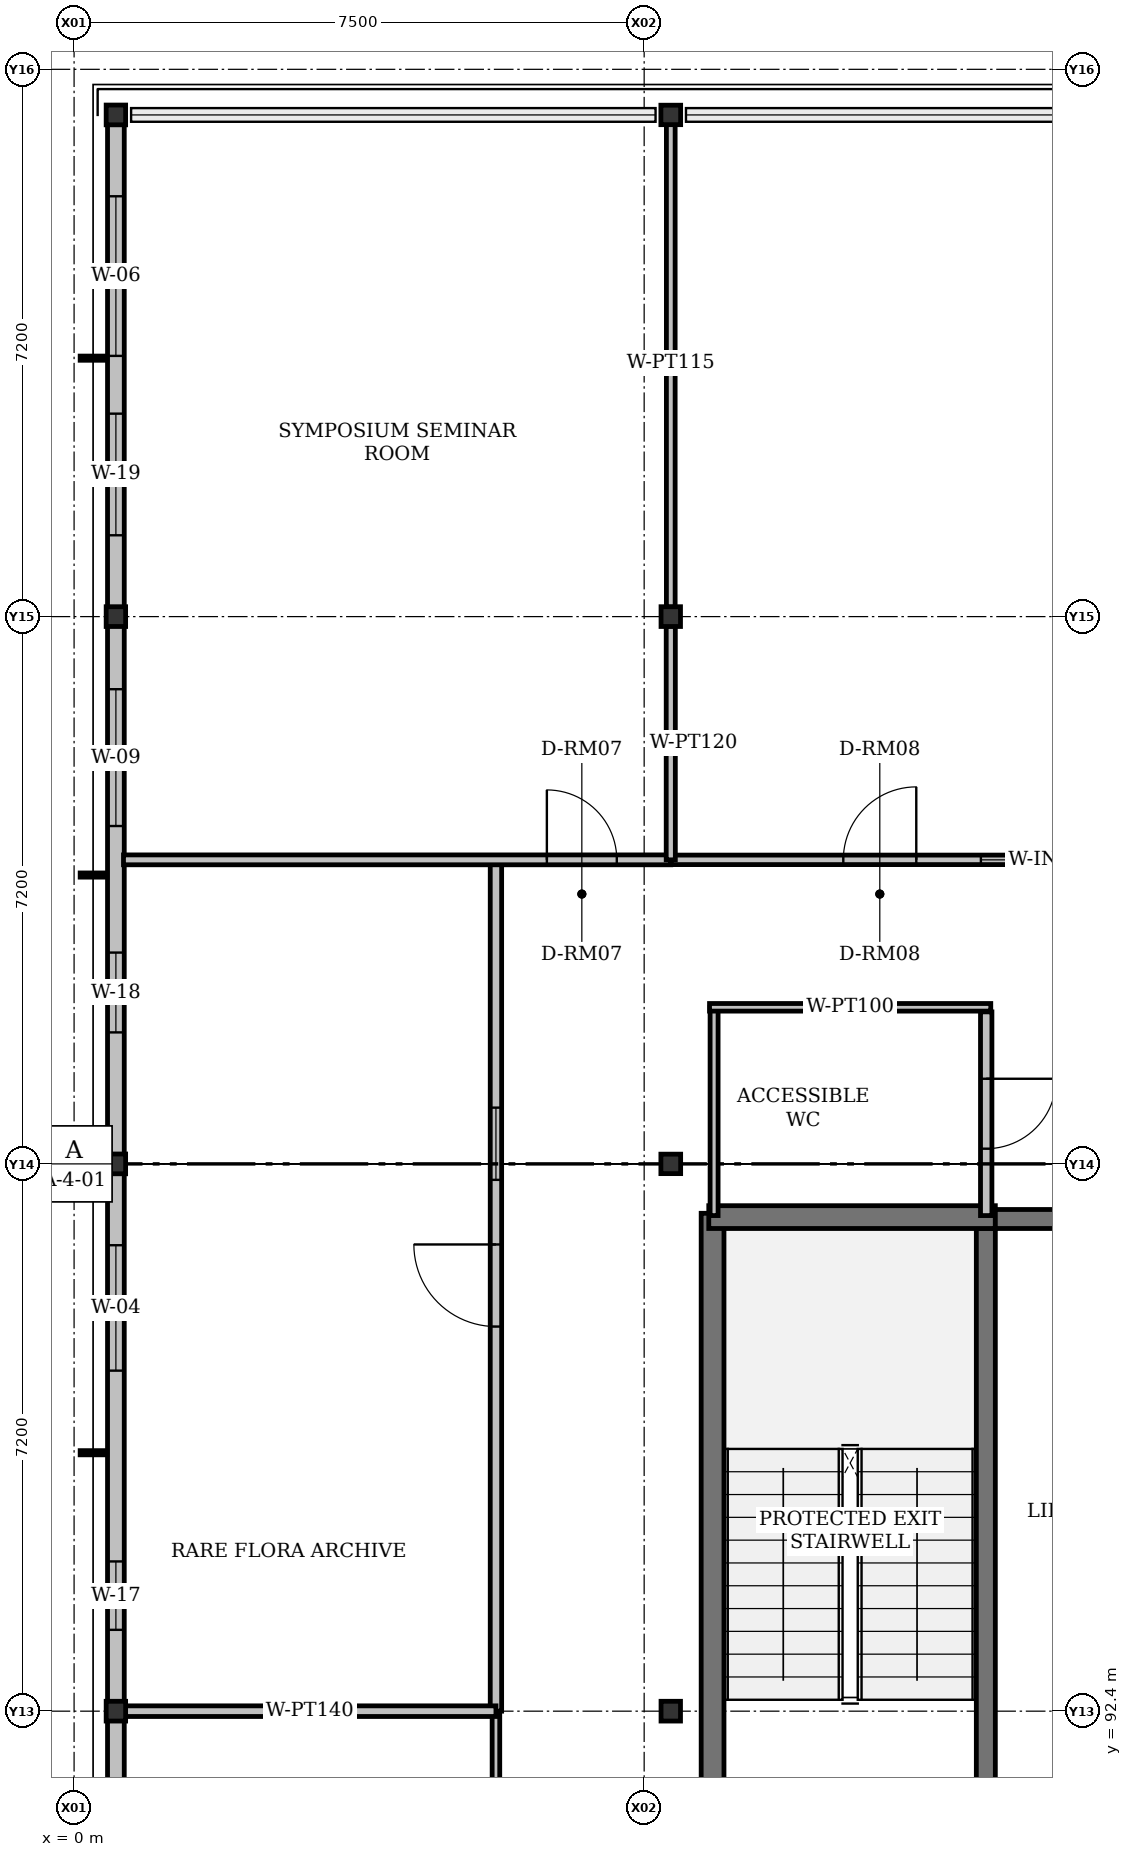
"""IFC4 building model, lengths in metres.
Left out: names, types, materials, properties, quantities, classifications, styles, units other than length and angle.
Written with IfcOpenShell. Run it as: python <this file> out.ifc"""

import sys

from ifc_helpers import new_model, si_unit, direction, frame, frame_2d, origin, origin_2d, place, context, subcontext, project, spatial, rectangle, i_section, extrude, element, fill, save


model = new_model("IFC4")
c1 = context("Model", 3, precision=1e-05, world=origin(), true_north=direction((0.0, 1.0)))
c2 = subcontext(c1, "Body", "Model", "MODEL_VIEW")
j1 = project(units=[si_unit("LENGTHUNIT", "METRE"), si_unit("PLANEANGLEUNIT", "RADIAN")], contexts=[c1])
p1 = place(None, origin())
s1 = spatial("IfcSite", under=j1, at=p1, CompositionType="ELEMENT")
p2 = place(p1, origin())
s2 = spatial("IfcBuilding", under=s1, at=p2, CompositionType="ELEMENT")
p3 = place(p2, frame((0.0, 0.0, 60.3)))
s3 = spatial("IfcBuildingStorey", under=s2, at=p3, CompositionType="ELEMENT", Elevation=60.3)
for number, where, z_axis, x_axis in (
    (1, (0.55, 92.4, 0.0), (0.0, 0.0, 1.0), (1.0, 0.0, 0.0)),
    (2, (7.85, 92.4, 0.0), (0.0, 0.0, 1.0), (1.0, 0.0, 0.0)),
    (3, (0.55, 99.6, 0.0), (0.0, 0.0, 1.0), (1.0, 0.0, 0.0)),
    (4, (7.85, 99.6, 0.0), (0.0, 0.0, 1.0), (0.0, 1.0, 0.0)),
    (5, (0.55, 106.8, 0.0), (0.0, 0.0, 1.0), (1.0, 0.0, 0.0)),
    (6, (7.85, 106.8, 0.0), (0.0, 0.0, 1.0), (1.0, 0.0, 0.0)),
    (7, (0.55, 113.4, 0.0), (0.0, 0.0, 1.0), (1.0, 0.0, 0.0)),
    (8, (7.85, 113.4, 0.0), (0.0, 0.0, 1.0), (0.0, 1.0, 0.0)),
):
    element("IfcColumn", number, at=place(p3, frame(where, z_axis=z_axis, x_axis=x_axis)), inside=s3, PredefinedType="COLUMN", context=c2, shape_type="SweptSolid", body=[
        extrude(i_section(OverallWidth=0.256, OverallDepth=0.26, WebThickness=0.011, FlangeThickness=0.017, FilletRadius=0.013, at=origin_2d()), origin(), (0.0, 0.0, 1.0), 4.2),
    ])
p4 = place(p3, frame((0.55, 85.2, 0.0), z_axis=(0.0, 0.0, 1.0), x_axis=(0.0, 1.0, 0.0)))
e9 = element("IfcWall", 9, at=p4, inside=s3, PredefinedType="SOLIDWALL", context=c2, shape_type="SweptSolid", body=[
    extrude(rectangle(XDim=7.2, YDim=0.22, at=frame_2d((3.6, 0.0))), origin(), (0.0, 0.0, 1.0), 3.577),
])
p5 = place(p4, frame((1.07, 0.0, 0.92)))
e10 = element("IfcOpeningElement", 10, at=p5, cuts=e9, PredefinedType="OPENING", context=c2, shape_type="SweptSolid", body=[
    extrude(rectangle(XDim=2.4, YDim=1.7, at=frame_2d((1.2, 0.85))), frame((0.0, 0.11, 0.0), z_axis=(0.0, -1.0, 0.0), x_axis=(1.0, 0.0, 0.0)), (0.0, 0.0, 1.0), 0.22),
])
p6 = place(p4, frame((4.63, 0.0, 0.92)))
e11 = element("IfcOpeningElement", 11, at=p6, cuts=e9, PredefinedType="OPENING", context=c2, shape_type="SweptSolid", body=[
    extrude(rectangle(XDim=1.5, YDim=1.4, at=frame_2d((0.75, 0.7))), frame((0.0, 0.11, 0.0), z_axis=(0.0, -1.0, 0.0), x_axis=(1.0, 0.0, 0.0)), (0.0, 0.0, 1.0), 0.22),
])
p7 = place(p3, frame((0.55, 92.4, 0.0), z_axis=(0.0, 0.0, 1.0), x_axis=(0.0, 1.0, 0.0)))
e12 = element("IfcWall", 12, at=p7, inside=s3, PredefinedType="SOLIDWALL", context=c2, shape_type="SweptSolid", body=[
    extrude(rectangle(XDim=7.2, YDim=0.22, at=frame_2d((3.6, 0.0))), origin(), (0.0, 0.0, 1.0), 3.577),
])
p8 = place(p7, frame((1.07, 0.0, 0.92)))
e13 = element("IfcOpeningElement", 13, at=p8, cuts=e12, PredefinedType="OPENING", context=c2, shape_type="SweptSolid", body=[
    extrude(rectangle(XDim=0.9, YDim=1.3, at=frame_2d((0.45, 0.65))), frame((0.0, 0.11, 0.0), z_axis=(0.0, -1.0, 0.0), x_axis=(1.0, 0.0, 0.0)), (0.0, 0.0, 1.0), 0.22),
])
p9 = place(p7, frame((4.48, 0.0, 0.92)))
e14 = element("IfcOpeningElement", 14, at=p9, cuts=e12, PredefinedType="OPENING", context=c2, shape_type="SweptSolid", body=[
    extrude(rectangle(XDim=1.65, YDim=1.4, at=frame_2d((0.825, 0.7))), frame((0.0, 0.11, 0.0), z_axis=(0.0, -1.0, 0.0), x_axis=(1.0, 0.0, 0.0)), (0.0, 0.0, 1.0), 0.22),
])
p10 = place(p3, frame((0.55, 99.6, 0.0), z_axis=(0.0, 0.0, 1.0), x_axis=(0.0, 1.0, 0.0)))
e15 = element("IfcWall", 15, at=p10, inside=s3, PredefinedType="SOLIDWALL", context=c2, shape_type="SweptSolid", body=[
    extrude(rectangle(XDim=7.2, YDim=0.22, at=frame_2d((3.6, 0.0))), origin(), (0.0, 0.0, 1.0), 3.577),
])
p11 = place(p10, frame((1.73, 0.0, 0.92)))
e16 = element("IfcOpeningElement", 16, at=p11, cuts=e15, PredefinedType="OPENING", context=c2, shape_type="SweptSolid", body=[
    extrude(rectangle(XDim=1.05, YDim=1.3, at=frame_2d((0.525, 0.65))), frame((0.0, 0.11, 0.0), z_axis=(0.0, -1.0, 0.0), x_axis=(1.0, 0.0, 0.0)), (0.0, 0.0, 1.0), 0.22),
])
p12 = place(p10, frame((4.445, 0.0, 0.92)))
e17 = element("IfcOpeningElement", 17, at=p12, cuts=e15, PredefinedType="OPENING", context=c2, shape_type="SweptSolid", body=[
    extrude(rectangle(XDim=1.8, YDim=1.55, at=frame_2d((0.9, 0.775))), frame((0.0, 0.11, 0.0), z_axis=(0.0, -1.0, 0.0), x_axis=(1.0, 0.0, 0.0)), (0.0, 0.0, 1.0), 0.22),
])
p13 = place(p3, frame((0.55, 106.8, 0.0), z_axis=(0.0, 0.0, 1.0), x_axis=(0.0, 1.0, 0.0)))
e18 = element("IfcWall", 18, at=p13, inside=s3, PredefinedType="SOLIDWALL", context=c2, shape_type="SweptSolid", body=[
    extrude(rectangle(XDim=6.6, YDim=0.22, at=frame_2d((3.3, 0.0))), origin(), (0.0, 0.0, 1.0), 3.577),
])
p14 = place(p13, frame((1.07, 0.0, 0.92)))
e19 = element("IfcOpeningElement", 19, at=p14, cuts=e18, PredefinedType="OPENING", context=c2, shape_type="SweptSolid", body=[
    extrude(rectangle(XDim=1.6, YDim=1.35, at=frame_2d((0.8, 0.675))), frame((0.0, 0.11, 0.0), z_axis=(0.0, -1.0, 0.0), x_axis=(1.0, 0.0, 0.0)), (0.0, 0.0, 1.0), 0.22),
])
p15 = place(p13, frame((3.43, 0.0, 0.92)))
e20 = element("IfcOpeningElement", 20, at=p15, cuts=e18, PredefinedType="OPENING", context=c2, shape_type="SweptSolid", body=[
    extrude(rectangle(XDim=2.1, YDim=1.4, at=frame_2d((1.05, 0.7))), frame((0.0, 0.11, 0.0), z_axis=(0.0, -1.0, 0.0), x_axis=(1.0, 0.0, 0.0)), (0.0, 0.0, 1.0), 0.22),
])
p16 = place(p3, frame((8.4, 90.775, 0.0), z_axis=(0.0, 0.0, 1.0), x_axis=(0.0, 1.0, 0.0)))
e21 = element("IfcWall", 21, at=p16, inside=s3, PredefinedType="SHEAR", context=c2, shape_type="SweptSolid", body=[
    extrude(rectangle(XDim=8.175, YDim=0.3, at=frame_2d((4.087, 0.0))), origin(), (0.0, 0.0, 1.0), 4.2),
])
p17 = place(p3, frame((11.995, 90.9, 0.0), z_axis=(0.0, 0.0, 1.0), x_axis=(0.0, 1.0, 0.0)))
e22 = element("IfcWall", 22, at=p17, inside=s3, PredefinedType="SHEAR", context=c2, shape_type="SweptSolid", body=[
    extrude(rectangle(XDim=7.85, YDim=0.25, at=frame_2d((3.925, 0.0))), origin(), (0.0, 0.0, 1.0), 4.2),
])
p18 = place(p3, frame((8.35, 98.9, 0.0), z_axis=(0.0, 0.0, 1.0), x_axis=(1.0, 0.0, 0.0)))
e23 = element("IfcWall", 23, at=p18, inside=s3, PredefinedType="SHEAR", context=c2, shape_type="SweptSolid", body=[
    extrude(rectangle(XDim=3.77, YDim=0.3, at=frame_2d((1.885, 0.0))), origin(), (0.0, 0.0, 1.0), 4.2),
])
p19 = place(p3, frame((12.12, 98.875, 0.0), z_axis=(0.0, 0.0, 1.0), x_axis=(1.0, 0.0, 0.0)))
e24 = element("IfcWall", 24, at=p19, inside=s3, PredefinedType="SHEAR", context=c2, shape_type="SweptSolid", body=[
    extrude(rectangle(XDim=4.03, YDim=0.25, at=frame_2d((2.015, 0.0))), origin(), (0.0, 0.0, 1.0), 4.2),
])
p20 = place(p19, frame((1.35, 0.0, 0.0)))
e25 = element("IfcOpeningElement", 25, at=p20, cuts=e24, PredefinedType="OPENING", context=c2, shape_type="SweptSolid", body=[
    extrude(rectangle(XDim=1.3, YDim=2.2, at=frame_2d((0.65, 1.1))), frame((0.0, 0.125, 0.0), z_axis=(0.0, -1.0, 0.0), x_axis=(1.0, 0.0, 0.0)), (0.0, 0.0, 1.0), 0.25),
])
p21 = place(p3, frame((8.42, 98.92, 0.0), z_axis=(0.0, 0.0, 1.0), x_axis=(0.0, 1.0, 0.0)))
e26 = element("IfcWall", 26, at=p21, inside=s3, PredefinedType="PARTITIONING", context=c2, shape_type="SweptSolid", body=[
    extrude(rectangle(XDim=2.74, YDim=0.105, at=frame_2d((1.37, 0.0))), origin(), (0.0, 0.0, 1.0), 3.451),
])
p22 = place(p3, frame((8.36, 101.66, 0.0), z_axis=(0.0, 0.0, 1.0), x_axis=(1.0, 0.0, 0.0)))
e27 = element("IfcWall", 27, at=p22, inside=s3, PredefinedType="PARTITIONING", context=c2, shape_type="SweptSolid", body=[
    extrude(rectangle(XDim=3.7, YDim=0.1, at=frame_2d((1.85, 0.0))), origin(), (0.0, 0.0, 1.0), 3.95),
])
p23 = place(p3, frame((12.0, 101.6, 0.0), z_axis=(0.0, 0.0, 1.0), x_axis=(0.0, -1.0, 0.0)))
e28 = element("IfcWall", 28, at=p23, inside=s3, PredefinedType="PARTITIONING", context=c2, shape_type="SweptSolid", body=[
    extrude(rectangle(XDim=2.68, YDim=0.15, at=frame_2d((1.34, 0.0))), origin(), (0.0, 0.0, 1.0), 3.451),
])
p24 = place(p23, frame((0.88, 0.0, 0.0)))
e29 = element("IfcOpeningElement", 29, at=p24, cuts=e28, PredefinedType="OPENING", context=c2, shape_type="SweptSolid", body=[
    extrude(rectangle(XDim=0.92, YDim=2.1, at=frame_2d((0.46, 1.05))), frame((0.0, 0.075, 0.0), z_axis=(0.0, -1.0, 0.0), x_axis=(1.0, 0.0, 0.0)), (0.0, 0.0, 1.0), 0.15),
])
p25 = place(p3, frame((5.55, 78.125, 0.0), z_axis=(0.0, 0.0, 1.0), x_axis=(0.0, 1.0, 0.0)))
e30 = element("IfcWall", 30, at=p25, inside=s3, PredefinedType="PARTITIONING", context=c2, shape_type="SweptSolid", body=[
    extrude(rectangle(XDim=14.275, YDim=0.1, at=frame_2d((7.137, 0.0))), origin(), (0.0, 0.0, 1.0), 3.451),
])
p26 = place(p25, frame((6.55, 0.0, 0.0)))
e31 = element("IfcOpeningElement", 31, at=p26, cuts=e30, PredefinedType="OPENING", context=c2, shape_type="SweptSolid", body=[
    extrude(rectangle(XDim=1.05, YDim=2.1, at=frame_2d((0.525, 1.05))), frame((0.0, 0.05, 0.0), z_axis=(0.0, -1.0, 0.0), x_axis=(1.0, 0.0, 0.0)), (0.0, 0.0, 1.0), 0.1),
])
p27 = place(p25, frame((8.45, 0.0, 0.92)))
e32 = element("IfcOpeningElement", 32, at=p27, cuts=e30, PredefinedType="OPENING", context=c2, shape_type="SweptSolid", body=[
    extrude(rectangle(XDim=0.85, YDim=1.1, at=frame_2d((0.425, 0.55))), frame((0.0, 0.05, 0.0), z_axis=(0.0, -1.0, 0.0), x_axis=(1.0, 0.0, 0.0)), (0.0, 0.0, 1.0), 0.1),
])
p28 = place(p3, frame((5.55, 92.4, 0.0), z_axis=(0.0, 0.0, 1.0), x_axis=(0.0, 1.0, 0.0)))
e33 = element("IfcWall", 33, at=p28, inside=s3, PredefinedType="PARTITIONING", context=c2, shape_type="SweptSolid", body=[
    extrude(rectangle(XDim=11.2, YDim=0.15, at=frame_2d((5.6, 0.0))), origin(), (0.0, 0.0, 1.0), 3.451),
])
p29 = place(p28, frame((5.06, 0.0, 0.0)))
e34 = element("IfcOpeningElement", 34, at=p29, cuts=e33, PredefinedType="OPENING", context=c2, shape_type="SweptSolid", body=[
    extrude(rectangle(XDim=1.08, YDim=2.1, at=frame_2d((0.54, 1.05))), frame((0.0, 0.075, 0.0), z_axis=(0.0, -1.0, 0.0), x_axis=(1.0, 0.0, 0.0)), (0.0, 0.0, 1.0), 0.15),
])
p30 = place(p28, frame((6.99, 0.0, 0.92)))
e35 = element("IfcOpeningElement", 35, at=p30, cuts=e33, PredefinedType="OPENING", context=c2, shape_type="SweptSolid", body=[
    extrude(rectangle(XDim=0.95, YDim=1.1, at=frame_2d((0.475, 0.55))), frame((0.0, 0.075, 0.0), z_axis=(0.0, -1.0, 0.0), x_axis=(1.0, 0.0, 0.0)), (0.0, 0.0, 1.0), 0.15),
])
p31 = place(p3, frame((0.65, 92.4, 0.0), z_axis=(0.0, 0.0, 1.0), x_axis=(1.0, 0.0, 0.0)))
e36 = element("IfcWall", 36, at=p31, inside=s3, PredefinedType="PARTITIONING", context=c2, shape_type="SweptSolid", body=[
    extrude(rectangle(XDim=4.9, YDim=0.14, at=frame_2d((2.45, 0.0))), origin(), (0.0, 0.0, 1.0), 3.451),
])
p32 = place(p3, frame((0.65, 103.6, 0.0), z_axis=(0.0, 0.0, 1.0), x_axis=(1.0, 0.0, 0.0)))
e37 = element("IfcWall", 37, at=p32, inside=s3, PredefinedType="PARTITIONING", context=c2, shape_type="SweptSolid", body=[
    extrude(rectangle(XDim=7.2, YDim=0.13, at=frame_2d((3.6, 0.0))), origin(), (0.0, 0.0, 1.0), 3.527),
])
p33 = place(p32, frame((5.57, 0.0, 0.0)))
e38 = element("IfcOpeningElement", 38, at=p33, cuts=e37, PredefinedType="OPENING", context=c2, shape_type="SweptSolid", body=[
    extrude(rectangle(XDim=0.92, YDim=2.15, at=frame_2d((0.46, 1.075))), frame((0.0, 0.065, 0.0), z_axis=(0.0, -1.0, 0.0), x_axis=(1.0, 0.0, 0.0)), (0.0, 0.0, 1.0), 0.13),
])
p34 = place(p3, frame((7.85, 103.6, 0.0), z_axis=(0.0, 0.0, 1.0), x_axis=(1.0, 0.0, 0.0)))
e39 = element("IfcWall", 39, at=p34, inside=s3, PredefinedType="PARTITIONING", context=c2, shape_type="SweptSolid", body=[
    extrude(rectangle(XDim=11.9, YDim=0.125, at=frame_2d((5.95, 0.0))), origin(), (0.0, 0.0, 1.0), 3.527),
])
p35 = place(p34, frame((2.27, 0.0, 0.0)))
e40 = element("IfcOpeningElement", 40, at=p35, cuts=e39, PredefinedType="OPENING", context=c2, shape_type="SweptSolid", body=[
    extrude(rectangle(XDim=0.96, YDim=2.15, at=frame_2d((0.48, 1.075))), frame((0.0, 0.062, 0.0), z_axis=(0.0, -1.0, 0.0), x_axis=(1.0, 0.0, 0.0)), (0.0, 0.0, 1.0), 0.125),
])
p36 = place(p34, frame((4.08, 0.0, 0.92)))
e41 = element("IfcOpeningElement", 41, at=p36, cuts=e39, PredefinedType="OPENING", context=c2, shape_type="SweptSolid", body=[
    extrude(rectangle(XDim=1.1, YDim=1.1, at=frame_2d((0.55, 0.55))), frame((0.0, 0.062, 0.0), z_axis=(0.0, -1.0, 0.0), x_axis=(1.0, 0.0, 0.0)), (0.0, 0.0, 1.0), 0.125),
])
p37 = place(p3, frame((7.85, 106.675, 0.0), z_axis=(0.0, 0.0, 1.0), x_axis=(0.0, -1.0, 0.0)))
e42 = element("IfcWall", 42, at=p37, inside=s3, PredefinedType="PARTITIONING", context=c2, shape_type="SweptSolid", body=[
    extrude(rectangle(XDim=3.075, YDim=0.12, at=frame_2d((1.538, 0.0))), origin(), (0.0, 0.0, 1.0), 3.527),
])
p38 = place(p3, frame((7.85, 113.35, 0.0), z_axis=(0.0, 0.0, 1.0), x_axis=(0.0, -1.0, 0.0)))
e43 = element("IfcWall", 43, at=p38, inside=s3, PredefinedType="PARTITIONING", context=c2, shape_type="SweptSolid", body=[
    extrude(rectangle(XDim=6.425, YDim=0.115, at=frame_2d((3.212, 0.0))), origin(), (0.0, 0.0, 1.0), 3.527),
])
p39 = place(p8, origin())
e44 = element("IfcWindow", 44, at=p39, inside=s3, PartitioningType="SINGLE_PANEL", PredefinedType="WINDOW", context=c2, shape_type="SweptSolid", body=[
    extrude(rectangle(XDim=0.9, YDim=1.3, at=frame_2d((0.45, 0.65))), frame((0.0, 0.03, 0.0), z_axis=(0.0, -1.0, 0.0), x_axis=(1.0, 0.0, 0.0)), (0.0, 0.0, 1.0), 0.06),
])
fill(e13, e44)
p40 = place(p9, origin())
e45 = element("IfcWindow", 45, at=p40, inside=s3, PartitioningType="DOUBLE_PANEL_VERTICAL", PredefinedType="WINDOW", context=c2, shape_type="SweptSolid", body=[
    extrude(rectangle(XDim=1.65, YDim=1.4, at=frame_2d((0.825, 0.7))), frame((0.0, 0.03, 0.0), z_axis=(0.0, -1.0, 0.0), x_axis=(1.0, 0.0, 0.0)), (0.0, 0.0, 1.0), 0.06),
])
fill(e14, e45)
p41 = place(p11, origin())
e46 = element("IfcWindow", 46, at=p41, inside=s3, PartitioningType="SINGLE_PANEL", PredefinedType="WINDOW", context=c2, shape_type="SweptSolid", body=[
    extrude(rectangle(XDim=1.05, YDim=1.3, at=frame_2d((0.525, 0.65))), frame((0.0, 0.03, 0.0), z_axis=(0.0, -1.0, 0.0), x_axis=(1.0, 0.0, 0.0)), (0.0, 0.0, 1.0), 0.06),
])
fill(e16, e46)
p42 = place(p12, origin())
e47 = element("IfcWindow", 47, at=p42, inside=s3, PartitioningType="DOUBLE_PANEL_VERTICAL", PredefinedType="WINDOW", context=c2, shape_type="SweptSolid", body=[
    extrude(rectangle(XDim=1.8, YDim=1.55, at=frame_2d((0.9, 0.775))), frame((0.0, 0.03, 0.0), z_axis=(0.0, -1.0, 0.0), x_axis=(1.0, 0.0, 0.0)), (0.0, 0.0, 1.0), 0.06),
])
fill(e17, e47)
p43 = place(p14, origin())
e48 = element("IfcWindow", 48, at=p43, inside=s3, PartitioningType="DOUBLE_PANEL_VERTICAL", PredefinedType="WINDOW", context=c2, shape_type="SweptSolid", body=[
    extrude(rectangle(XDim=1.6, YDim=1.35, at=frame_2d((0.8, 0.675))), frame((0.0, 0.03, 0.0), z_axis=(0.0, -1.0, 0.0), x_axis=(1.0, 0.0, 0.0)), (0.0, 0.0, 1.0), 0.06),
])
fill(e19, e48)
p44 = place(p15, origin())
e49 = element("IfcWindow", 49, at=p44, inside=s3, PartitioningType="DOUBLE_PANEL_VERTICAL", PredefinedType="WINDOW", context=c2, shape_type="SweptSolid", body=[
    extrude(rectangle(XDim=2.1, YDim=1.4, at=frame_2d((1.05, 0.7))), frame((0.0, 0.03, 0.0), z_axis=(0.0, -1.0, 0.0), x_axis=(1.0, 0.0, 0.0)), (0.0, 0.0, 1.0), 0.06),
])
fill(e20, e49)
p45 = place(p24, origin())
e50 = element("IfcDoor", 50, at=p45, inside=s3, OperationType="SINGLE_SWING_LEFT", PredefinedType="DOOR", context=c2, shape_type="SweptSolid", body=[
    extrude(rectangle(XDim=0.92, YDim=2.1, at=frame_2d((0.46, 1.05))), frame((0.0, 0.025, 0.0), z_axis=(0.0, -1.0, 0.0), x_axis=(1.0, 0.0, 0.0)), (0.0, 0.0, 1.0), 0.05),
])
fill(e29, e50)
p46 = place(p29, origin())
e51 = element("IfcDoor", 51, at=p46, inside=s3, OperationType="SINGLE_SWING_RIGHT", PredefinedType="DOOR", context=c2, shape_type="SweptSolid", body=[
    extrude(rectangle(XDim=1.08, YDim=2.1, at=frame_2d((0.54, 1.05))), frame((0.0, 0.025, 0.0), z_axis=(0.0, -1.0, 0.0), x_axis=(1.0, 0.0, 0.0)), (0.0, 0.0, 1.0), 0.05),
])
fill(e34, e51)
p47 = place(p30, origin())
e52 = element("IfcWindow", 52, at=p47, inside=s3, PartitioningType="SINGLE_PANEL", PredefinedType="WINDOW", context=c2, shape_type="SweptSolid", body=[
    extrude(rectangle(XDim=0.95, YDim=1.1, at=frame_2d((0.475, 0.55))), frame((0.0, 0.03, 0.0), z_axis=(0.0, -1.0, 0.0), x_axis=(1.0, 0.0, 0.0)), (0.0, 0.0, 1.0), 0.06),
])
fill(e35, e52)
p48 = place(p33, origin())
e53 = element("IfcDoor", 53, at=p48, inside=s3, OperationType="SINGLE_SWING_LEFT", PredefinedType="DOOR", context=c2, shape_type="SweptSolid", body=[
    extrude(rectangle(XDim=0.92, YDim=2.15, at=frame_2d((0.46, 1.075))), frame((0.0, 0.025, 0.0), z_axis=(0.0, -1.0, 0.0), x_axis=(1.0, 0.0, 0.0)), (0.0, 0.0, 1.0), 0.05),
])
fill(e38, e53)
p49 = place(p35, origin())
e54 = element("IfcDoor", 54, at=p49, inside=s3, OperationType="SINGLE_SWING_RIGHT", PredefinedType="DOOR", context=c2, shape_type="SweptSolid", body=[
    extrude(rectangle(XDim=0.96, YDim=2.15, at=frame_2d((0.48, 1.075))), frame((0.0, 0.025, 0.0), z_axis=(0.0, -1.0, 0.0), x_axis=(1.0, 0.0, 0.0)), (0.0, 0.0, 1.0), 0.05),
])
fill(e40, e54)
p50 = place(p36, origin())
e55 = element("IfcWindow", 55, at=p50, inside=s3, PartitioningType="SINGLE_PANEL", PredefinedType="WINDOW", context=c2, shape_type="SweptSolid", body=[
    extrude(rectangle(XDim=1.1, YDim=1.1, at=frame_2d((0.55, 0.55))), frame((0.0, 0.03, 0.0), z_axis=(0.0, -1.0, 0.0), x_axis=(1.0, 0.0, 0.0)), (0.0, 0.0, 1.0), 0.06),
])
fill(e41, e55)
save(model, sys.argv[1])
